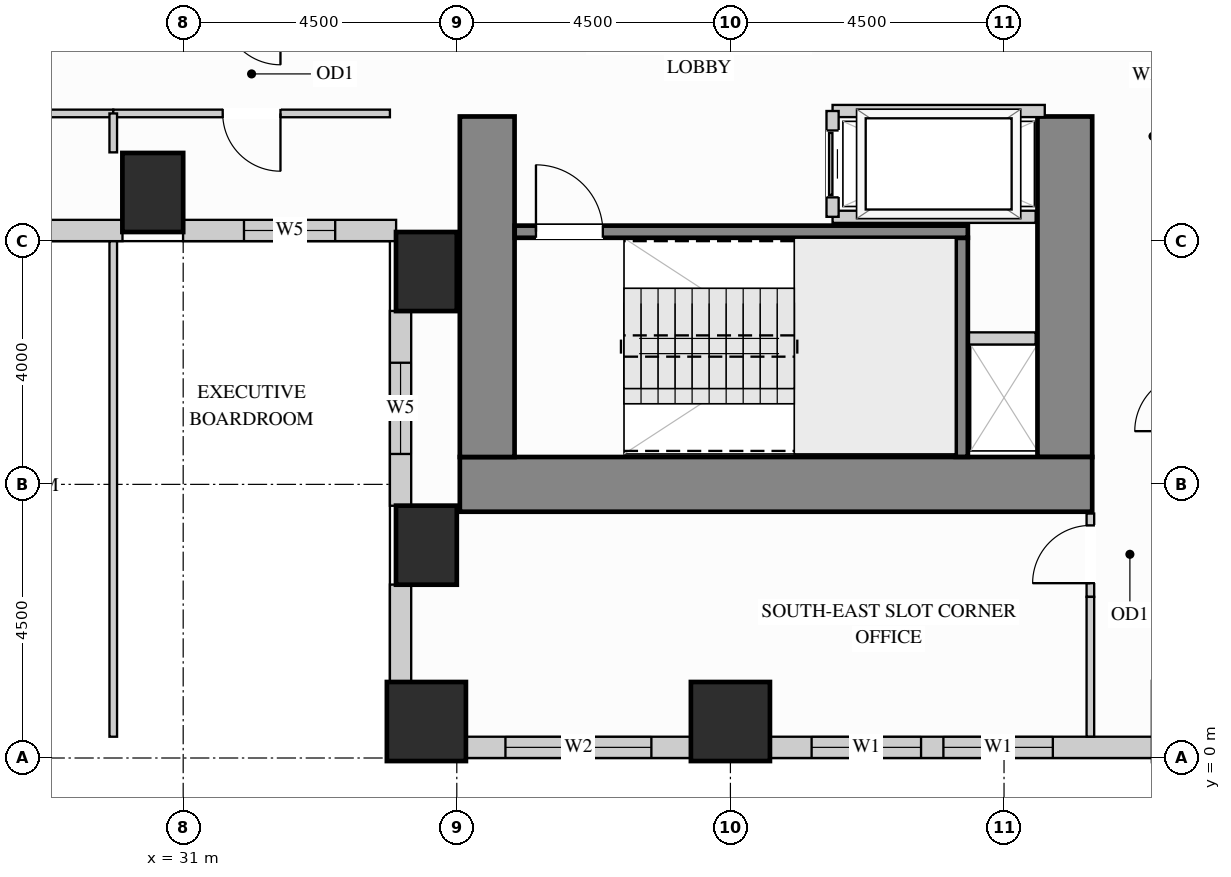
"""IFC4 building model, lengths in metres.
Left out: names, types, materials, properties, quantities, classifications, styles, units other than length and angle.
Written with IfcOpenShell. Run it as: python <this file> out.ifc"""

import sys

from ifc_helpers import new_model, si_unit, direction, frame, frame_2d, origin, origin_2d, place, context, subcontext, project, spatial, rectangle, extrude, source, transform, mapped, element, fill, save


model = new_model("IFC4")
c1 = context("Model", 3, precision=1e-05, world=origin(), true_north=direction((0.0, 1.0)))
c2 = subcontext(c1, "Body", "Model", "MODEL_VIEW")
j1 = project(units=[si_unit("LENGTHUNIT", "METRE"), si_unit("PLANEANGLEUNIT", "RADIAN")], contexts=[c1])
p1 = place(None, origin())
s1 = spatial("IfcSite", under=j1, at=p1, CompositionType="ELEMENT")
p2 = place(p1, origin())
s2 = spatial("IfcBuilding", under=s1, at=p2, CompositionType="ELEMENT")
p3 = place(p2, frame((0.0, 0.0, 51.3)))
s3 = spatial("IfcBuildingStorey", under=s2, at=p3, CompositionType="ELEMENT", Elevation=51.3)
m1 = source(origin(), c2, "Body", "SweptSolid", [
    extrude(rectangle(XDim=1.0, YDim=1.3, at=origin_2d()), origin(), (0.0, 0.0, 1.0), 3.38),
])
for number, where, z_axis, x_axis in (
    (1, (35.0, 3.5, 0.0), (0.0, 0.0, 1.0), (1.0, 0.0, 0.0)),
    (2, (35.0, 8.0, 0.0), (0.0, 0.0, 1.0), (1.0, 0.0, 0.0)),
    (3, (30.5, 9.3, 0.0), (0.0, 0.0, 1.0), (1.0, 0.0, 0.0)),
):
    element("IfcColumn", number, at=place(p3, frame(where, z_axis=z_axis, x_axis=x_axis)), inside=s3, PredefinedType="COLUMN", context=c2, shape_type="MappedRepresentation", body=[
        mapped(m1, transform((0.0, 0.0, 0.0), x_axis=(1.0, 0.0, 0.0), y_axis=(0.0, 1.0, 0.0), z_axis=(0.0, 0.0, 1.0))),
    ])
m2 = source(origin(), c2, "Body", "SweptSolid", [
    extrude(rectangle(XDim=1.3, YDim=1.3, at=origin_2d()), origin(), (0.0, 0.0, 1.0), 3.38),
])
for number, where, z_axis, x_axis in (
    (4, (35.0, 0.6, 0.0), (0.0, 0.0, 1.0), (1.0, 0.0, 0.0)),
    (5, (40.0, 0.6, 0.0), (0.0, 0.0, 1.0), (1.0, 0.0, 0.0)),
):
    element("IfcColumn", number, at=place(p3, frame(where, z_axis=z_axis, x_axis=x_axis)), inside=s3, PredefinedType="COLUMN", context=c2, shape_type="MappedRepresentation", body=[
        mapped(m2, transform((0.0, 0.0, 0.0), x_axis=(1.0, 0.0, 0.0), y_axis=(0.0, 1.0, 0.0), z_axis=(0.0, 0.0, 1.0))),
    ])
m3 = source(origin(), c2, "Body", "SweptSolid", [
    extrude(rectangle(XDim=5.6, YDim=0.9, at=frame_2d((2.8, 0.0))), origin(), (0.0, 0.0, 1.0), 3.38),
])
p4 = place(p3, frame((45.5, 4.95, 0.0), z_axis=(0.0, 0.0, 1.0), x_axis=(0.0, 1.0, 0.0)))
e6 = element("IfcWall", 6, at=p4, inside=s3, PredefinedType="SHEAR", context=c2, shape_type="MappedRepresentation", body=[
    mapped(m3, transform((0.0, 0.0, 0.0), x_axis=(1.0, 0.0, 0.0), y_axis=(0.0, 1.0, 0.0), z_axis=(0.0, 0.0, 1.0))),
])
m4 = source(origin(), c2, "Body", "SweptSolid", [
    extrude(rectangle(XDim=10.4, YDim=0.9, at=frame_2d((5.2, 0.0))), origin(), (0.0, 0.0, 1.0), 3.38),
])
p5 = place(p3, frame((35.55, 4.5, 0.0), z_axis=(0.0, 0.0, 1.0), x_axis=(1.0, 0.0, 0.0)))
e7 = element("IfcWall", 7, at=p5, inside=s3, PredefinedType="SHEAR", context=c2, shape_type="MappedRepresentation", body=[
    mapped(m4, transform((0.0, 0.0, 0.0), x_axis=(1.0, 0.0, 0.0), y_axis=(0.0, 1.0, 0.0), z_axis=(0.0, 0.0, 1.0))),
])
p6 = place(p3, frame((36.0, 4.95, 0.0), z_axis=(0.0, 0.0, 1.0), x_axis=(0.0, 1.0, 0.0)))
e8 = element("IfcWall", 8, at=p6, inside=s3, PredefinedType="SHEAR", context=c2, shape_type="MappedRepresentation", body=[
    mapped(m3, transform((0.0, 0.0, 0.0), x_axis=(1.0, 0.0, 0.0), y_axis=(0.0, 1.0, 0.0), z_axis=(0.0, 0.0, 1.0))),
])
p7 = place(p3, frame((23.898, 8.675, 0.0), z_axis=(0.0, 0.0, 1.0), x_axis=(1.0, 0.0, 0.0)))
e9 = element("IfcWall", 9, at=p7, inside=s3, PredefinedType="SOLIDWALL", context=c2, shape_type="SweptSolid", body=[
    extrude(rectangle(XDim=6.104, YDim=0.35, at=frame_2d((3.052, 0.0))), origin(), (0.0, 0.0, 1.0), 3.365),
])
p8 = place(p7, frame((1.114, 0.0, 0.78)))
e10 = element("IfcOpeningElement", 10, at=p8, cuts=e9, PredefinedType="OPENING", context=c2, shape_type="SweptSolid", body=[
    extrude(rectangle(XDim=1.5, YDim=2.0, at=frame_2d((0.75, 1.0))), frame((0.0, 0.185, 0.0), z_axis=(0.0, -1.0, 0.0), x_axis=(1.0, 0.0, 0.0)), (0.0, 0.0, 1.0), 0.37),
])
p9 = place(p7, frame((3.408, 0.0, 0.78)))
e11 = element("IfcOpeningElement", 11, at=p9, cuts=e9, PredefinedType="OPENING", context=c2, shape_type="SweptSolid", body=[
    extrude(rectangle(XDim=1.5, YDim=2.0, at=frame_2d((0.75, 1.0))), frame((0.0, 0.185, 0.0), z_axis=(0.0, -1.0, 0.0), x_axis=(1.0, 0.0, 0.0)), (0.0, 0.0, 1.0), 0.37),
])
p10 = place(p3, frame((30.998, 8.675, 0.0), z_axis=(0.0, 0.0, 1.0), x_axis=(1.0, 0.0, 0.0)))
e12 = element("IfcWall", 12, at=p10, inside=s3, PredefinedType="SOLIDWALL", context=c2, shape_type="SweptSolid", body=[
    extrude(rectangle(XDim=3.504, YDim=0.35, at=frame_2d((1.752, 0.0))), origin(), (0.0, 0.0, 1.0), 3.365),
])
p11 = place(p10, frame((1.002, 0.0, 0.78)))
e13 = element("IfcOpeningElement", 13, at=p11, cuts=e12, PredefinedType="OPENING", context=c2, shape_type="SweptSolid", body=[
    extrude(rectangle(XDim=1.5, YDim=2.0, at=frame_2d((0.75, 1.0))), frame((0.0, 0.185, 0.0), z_axis=(0.0, -1.0, 0.0), x_axis=(1.0, 0.0, 0.0)), (0.0, 0.0, 1.0), 0.37),
])
p12 = place(p3, frame((34.575, 7.352, 0.0), z_axis=(0.0, 0.0, 1.0), x_axis=(0.0, -1.0, 0.0)))
e14 = element("IfcWall", 14, at=p12, inside=s3, PredefinedType="SOLIDWALL", context=c2, shape_type="SweptSolid", body=[
    extrude(rectangle(XDim=3.204, YDim=0.35, at=frame_2d((1.602, 0.0))), origin(), (0.0, 0.0, 1.0), 2.51),
])
p13 = place(p12, frame((0.852, 0.0, 0.78)))
e15 = element("IfcOpeningElement", 15, at=p13, cuts=e14, PredefinedType="OPENING", context=c2, shape_type="SweptSolid", body=[
    extrude(rectangle(XDim=1.5, YDim=1.55, at=frame_2d((0.75, 0.775))), frame((0.0, 0.185, 0.0), z_axis=(0.0, -1.0, 0.0), x_axis=(1.0, 0.0, 0.0)), (0.0, 0.0, 1.0), 0.37),
])
m5 = source(origin(), c2, "Body", "SweptSolid", [
    extrude(rectangle(XDim=1.604, YDim=0.35, at=frame_2d((0.802, 0.0))), origin(), (0.0, 0.0, 1.0), 2.51),
])
p14 = place(p3, frame((34.575, 2.852, 0.0), z_axis=(0.0, 0.0, 1.0), x_axis=(0.0, -1.0, 0.0)))
e16 = element("IfcWall", 16, at=p14, inside=s3, PredefinedType="SOLIDWALL", context=c2, shape_type="MappedRepresentation", body=[
    mapped(m5, transform((0.0, 0.0, 0.0), x_axis=(1.0, 0.0, 0.0), y_axis=(0.0, 1.0, 0.0), z_axis=(0.0, 0.0, 1.0))),
])
p15 = place(p3, frame((35.648, 0.175, 0.0), z_axis=(0.0, 0.0, 1.0), x_axis=(1.0, 0.0, 0.0)))
e17 = element("IfcWall", 17, at=p15, inside=s3, PredefinedType="SOLIDWALL", context=c2, shape_type="SweptSolid", body=[
    extrude(rectangle(XDim=3.704, YDim=0.35, at=frame_2d((1.852, 0.0))), origin(), (0.0, 0.0, 1.0), 2.51),
])
p16 = place(p15, frame((0.652, 0.0, 0.78)))
e18 = element("IfcOpeningElement", 18, at=p16, cuts=e17, PredefinedType="OPENING", context=c2, shape_type="SweptSolid", body=[
    extrude(rectangle(XDim=2.4, YDim=1.55, at=frame_2d((1.2, 0.775))), frame((0.0, 0.185, 0.0), z_axis=(0.0, -1.0, 0.0), x_axis=(1.0, 0.0, 0.0)), (0.0, 0.0, 1.0), 0.37),
])
p17 = place(p3, frame((40.648, 0.175, 0.0), z_axis=(0.0, 0.0, 1.0), x_axis=(1.0, 0.0, 0.0)))
e19 = element("IfcWall", 19, at=p17, inside=s3, PredefinedType="SOLIDWALL", context=c2, shape_type="SweptSolid", body=[
    extrude(rectangle(XDim=6.304, YDim=0.35, at=frame_2d((3.152, 0.0))), origin(), (0.0, 0.0, 1.0), 2.51),
])
p18 = place(p17, frame((0.687, 0.0, 0.78)))
e20 = element("IfcOpeningElement", 20, at=p18, cuts=e19, PredefinedType="OPENING", context=c2, shape_type="SweptSolid", body=[
    extrude(rectangle(XDim=1.8, YDim=1.55, at=frame_2d((0.9, 0.775))), frame((0.0, 0.185, 0.0), z_axis=(0.0, -1.0, 0.0), x_axis=(1.0, 0.0, 0.0)), (0.0, 0.0, 1.0), 0.37),
])
p19 = place(p17, frame((2.855, 0.0, 0.78)))
e21 = element("IfcOpeningElement", 21, at=p19, cuts=e19, PredefinedType="OPENING", context=c2, shape_type="SweptSolid", body=[
    extrude(rectangle(XDim=1.8, YDim=1.55, at=frame_2d((0.9, 0.775))), frame((0.0, 0.185, 0.0), z_axis=(0.0, -1.0, 0.0), x_axis=(1.0, 0.0, 0.0)), (0.0, 0.0, 1.0), 0.37),
])
p20 = place(p3, frame((45.92, 2.65, 0.0), z_axis=(0.0, 0.0, 1.0), x_axis=(0.0, 1.0, 0.0)))
e22 = element("IfcWall", 22, at=p20, inside=s3, PredefinedType="PARTITIONING", context=c2, shape_type="SweptSolid", body=[
    extrude(rectangle(XDim=1.37, YDim=0.125, at=frame_2d((0.685, 0.0))), origin(), (0.0, 0.0, 1.0), 3.365),
])
p21 = place(p20, frame((0.225, 0.0, 0.0)))
e23 = element("IfcOpeningElement", 23, at=p21, cuts=e22, PredefinedType="OPENING", context=c2, shape_type="SweptSolid", body=[
    extrude(rectangle(XDim=0.95, YDim=2.15, at=frame_2d((0.475, 1.075))), frame((0.0, 0.073, 0.0), z_axis=(0.0, -1.0, 0.0), x_axis=(1.0, 0.0, 0.0)), (0.0, 0.0, 1.0), 0.145),
])
m6 = source(origin(), c2, "Body", "SweptSolid", [
    extrude(rectangle(XDim=2.298, YDim=0.125, at=frame_2d((1.149, 0.0))), origin(), (0.0, 0.0, 1.0), 3.365),
])
p22 = place(p3, frame((45.92, 0.352, 0.0), z_axis=(0.0, 0.0, 1.0), x_axis=(0.0, 1.0, 0.0)))
e24 = element("IfcWall", 24, at=p22, inside=s3, PredefinedType="PARTITIONING", context=c2, shape_type="MappedRepresentation", body=[
    mapped(m6, transform((0.0, 0.0, 0.0), x_axis=(1.0, 0.0, 0.0), y_axis=(0.0, 1.0, 0.0), z_axis=(0.0, 0.0, 1.0))),
])
p23 = place(p3, frame((23.85, 10.6, 0.0), z_axis=(0.0, 0.0, 1.0), x_axis=(1.0, 0.0, 0.0)))
e25 = element("IfcWall", 25, at=p23, inside=s3, PredefinedType="PARTITIONING", context=c2, shape_type="SweptSolid", body=[
    extrude(rectangle(XDim=6.0, YDim=0.125, at=frame_2d((3.0, 0.0))), origin(), (0.0, 0.0, 1.0), 3.365),
])
p24 = place(p23, frame((2.525, 0.0, 0.0)))
e26 = element("IfcOpeningElement", 26, at=p24, cuts=e25, PredefinedType="OPENING", context=c2, shape_type="SweptSolid", body=[
    extrude(rectangle(XDim=0.95, YDim=2.15, at=frame_2d((0.475, 1.075))), frame((0.0, 0.073, 0.0), z_axis=(0.0, -1.0, 0.0), x_axis=(1.0, 0.0, 0.0)), (0.0, 0.0, 1.0), 0.145),
])
p25 = place(p3, frame((29.85, 10.6, 0.0), z_axis=(0.0, 0.0, 1.0), x_axis=(1.0, 0.0, 0.0)))
e27 = element("IfcWall", 27, at=p25, inside=s3, PredefinedType="PARTITIONING", context=c2, shape_type="SweptSolid", body=[
    extrude(rectangle(XDim=4.55, YDim=0.125, at=frame_2d((2.275, 0.0))), origin(), (0.0, 0.0, 1.0), 3.365),
])
p26 = place(p25, frame((1.8, 0.0, 0.0)))
e28 = element("IfcOpeningElement", 28, at=p26, cuts=e27, PredefinedType="OPENING", context=c2, shape_type="SweptSolid", body=[
    extrude(rectangle(XDim=0.95, YDim=2.15, at=frame_2d((0.475, 1.075))), frame((0.0, 0.073, 0.0), z_axis=(0.0, -1.0, 0.0), x_axis=(1.0, 0.0, 0.0)), (0.0, 0.0, 1.0), 0.145),
])
m7 = source(origin(), c2, "Body", "SweptSolid", [
    extrude(rectangle(XDim=8.148, YDim=0.125, at=frame_2d((4.074, 0.0))), origin(), (0.0, 0.0, 1.0), 3.365),
])
p27 = place(p3, frame((29.85, 0.35, 0.0), z_axis=(0.0, 0.0, 1.0), x_axis=(0.0, 1.0, 0.0)))
e29 = element("IfcWall", 29, at=p27, inside=s3, PredefinedType="PARTITIONING", context=c2, shape_type="MappedRepresentation", body=[
    mapped(m7, transform((0.0, 0.0, 0.0), x_axis=(1.0, 0.0, 0.0), y_axis=(0.0, 1.0, 0.0), z_axis=(0.0, 0.0, 1.0))),
])
m8 = source(origin(), c2, "Body", "SweptSolid", [
    extrude(rectangle(XDim=0.64, YDim=0.125, at=frame_2d((0.32, 0.0))), origin(), (0.0, 0.0, 1.0), 3.365),
])
p28 = place(p3, frame((29.85, 9.96, 0.0), z_axis=(0.0, 0.0, 1.0), x_axis=(0.0, 1.0, 0.0)))
e30 = element("IfcWall", 30, at=p28, inside=s3, PredefinedType="PARTITIONING", context=c2, shape_type="MappedRepresentation", body=[
    mapped(m8, transform((0.0, 0.0, 0.0), x_axis=(1.0, 0.0, 0.0), y_axis=(0.0, 1.0, 0.0), z_axis=(0.0, 0.0, 1.0))),
])
m9 = source(origin(), c2, "Body", "SweptSolid", [
    extrude(rectangle(XDim=1.17, YDim=0.2, at=frame_2d((0.585, 0.0))), origin(), (0.0, 0.0, 1.0), 3.365),
])
p29 = place(p3, frame((43.85, 6.9, 0.0), z_axis=(0.0, 0.0, 1.0), x_axis=(1.0, 0.0, 0.0)))
e31 = element("IfcWall", 31, at=p29, inside=s3, PredefinedType="PARTITIONING", context=c2, shape_type="MappedRepresentation", body=[
    mapped(m9, transform((0.0, 0.0, 0.0), x_axis=(1.0, 0.0, 0.0), y_axis=(0.0, 1.0, 0.0), z_axis=(0.0, 0.0, 1.0))),
])
m10 = source(origin(), c2, "Body", "SweptSolid", [
    extrude(rectangle(XDim=3.49, YDim=0.2, at=frame_2d((1.745, 0.0))), origin(), (0.0, 0.0, 1.0), 3.365),
])
p30 = place(p3, frame((41.68, 10.64, 0.0), z_axis=(0.0, 0.0, 1.0), x_axis=(1.0, 0.0, 0.0)))
e32 = element("IfcWall", 32, at=p30, inside=s3, PredefinedType="PARTITIONING", context=c2, shape_type="MappedRepresentation", body=[
    mapped(m10, transform((0.0, 0.0, 0.0), x_axis=(1.0, 0.0, 0.0), y_axis=(0.0, 1.0, 0.0), z_axis=(0.0, 0.0, 1.0))),
])
m11 = source(origin(), c2, "Body", "SweptSolid", [
    extrude(rectangle(XDim=3.34, YDim=0.2, at=frame_2d((1.67, 0.0))), origin(), (0.0, 0.0, 1.0), 3.365),
])
p31 = place(p3, frame((41.68, 8.9, 0.0), z_axis=(0.0, 0.0, 1.0), x_axis=(1.0, 0.0, 0.0)))
e33 = element("IfcWall", 33, at=p31, inside=s3, PredefinedType="PARTITIONING", context=c2, shape_type="MappedRepresentation", body=[
    mapped(m11, transform((0.0, 0.0, 0.0), x_axis=(1.0, 0.0, 0.0), y_axis=(0.0, 1.0, 0.0), z_axis=(0.0, 0.0, 1.0))),
])
p32 = place(p3, frame((41.68, 8.9, 0.0), z_axis=(0.0, 0.0, 1.0), x_axis=(0.0, 1.0, 0.0)))
e34 = element("IfcWall", 34, at=p32, inside=s3, PredefinedType="PARTITIONING", context=c2, shape_type="SweptSolid", body=[
    extrude(rectangle(XDim=1.74, YDim=0.2, at=frame_2d((0.87, 0.0))), origin(), (0.0, 0.0, 1.0), 3.365),
])
p33 = place(p32, frame((0.32, 0.0, 0.0)))
e35 = element("IfcOpeningElement", 35, at=p33, cuts=e34, PredefinedType="OPENING", context=c2, shape_type="SweptSolid", body=[
    extrude(rectangle(XDim=1.1, YDim=2.2, at=frame_2d((0.55, 1.1))), frame((0.0, 0.11, 0.0), z_axis=(0.0, -1.0, 0.0), x_axis=(1.0, 0.0, 0.0)), (0.0, 0.0, 1.0), 0.22),
])
m12 = source(origin(), c2, "Body", "SweptSolid", [
    extrude(rectangle(XDim=3.603, YDim=0.2, at=frame_2d((1.802, 0.0))), origin(), (0.0, 0.0, 1.0), 3.38),
])
p34 = place(p3, frame((43.805, 4.952, 0.0), z_axis=(0.0, 0.0, 1.0), x_axis=(0.0, 1.0, 0.0)))
e36 = element("IfcWall", 36, at=p34, inside=s3, PredefinedType="SHEAR", context=c2, shape_type="MappedRepresentation", body=[
    mapped(m12, transform((0.0, 0.0, 0.0), x_axis=(1.0, 0.0, 0.0), y_axis=(0.0, 1.0, 0.0), z_axis=(0.0, 0.0, 1.0))),
])
p35 = place(p3, frame((36.452, 8.655, 0.0), z_axis=(0.0, 0.0, 1.0), x_axis=(1.0, 0.0, 0.0)))
e37 = element("IfcWall", 37, at=p35, inside=s3, PredefinedType="SHEAR", context=c2, shape_type="SweptSolid", body=[
    extrude(rectangle(XDim=7.453, YDim=0.2, at=frame_2d((3.727, 0.0))), origin(), (0.0, 0.0, 1.0), 3.38),
])
p36 = place(p35, frame((0.35, 0.0, 0.0)))
e38 = element("IfcOpeningElement", 38, at=p36, cuts=e37, PredefinedType="OPENING", context=c2, shape_type="SweptSolid", body=[
    extrude(rectangle(XDim=1.1, YDim=2.15, at=frame_2d((0.55, 1.075))), frame((0.0, 0.11, 0.0), z_axis=(0.0, -1.0, 0.0), x_axis=(1.0, 0.0, 0.0)), (0.0, 0.0, 1.0), 0.22),
])
m13 = source(origin(), c2, "Body", "SweptSolid", [
    extrude(rectangle(XDim=1.1, YDim=2.2, at=frame_2d((0.55, 1.1))), frame((0.0, 0.025, 0.0), z_axis=(0.0, -1.0, 0.0), x_axis=(1.0, 0.0, 0.0)), (0.0, 0.0, 1.0), 0.05),
])
p37 = place(p33, origin())
e39 = element("IfcDoor", 39, at=p37, inside=s3, OperationType="SLIDING_TO_LEFT", PredefinedType="DOOR", context=c2, shape_type="MappedRepresentation", body=[
    mapped(m13, transform((0.0, 0.0, 0.0), x_axis=(1.0, 0.0, 0.0), y_axis=(0.0, 1.0, 0.0), z_axis=(0.0, 0.0, 1.0))),
])
fill(e35, e39)
m14 = source(origin(), c2, "Body", "SweptSolid", [
    extrude(rectangle(XDim=0.95, YDim=2.15, at=frame_2d((0.475, 1.075))), frame((0.0, 0.025, 0.0), z_axis=(0.0, -1.0, 0.0), x_axis=(1.0, 0.0, 0.0)), (0.0, 0.0, 1.0), 0.05),
])
p38 = place(p21, origin())
e40 = element("IfcDoor", 40, at=p38, inside=s3, OperationType="SINGLE_SWING_LEFT", PredefinedType="DOOR", context=c2, shape_type="MappedRepresentation", body=[
    mapped(m14, transform((0.0, 0.0, 0.0), x_axis=(1.0, 0.0, 0.0), y_axis=(0.0, 1.0, 0.0), z_axis=(0.0, 0.0, 1.0))),
])
fill(e23, e40)
p39 = place(p26, origin())
e41 = element("IfcDoor", 41, at=p39, inside=s3, OperationType="SINGLE_SWING_RIGHT", PredefinedType="DOOR", context=c2, shape_type="MappedRepresentation", body=[
    mapped(m14, transform((0.0, 0.0, 0.0), x_axis=(1.0, 0.0, 0.0), y_axis=(0.0, 1.0, 0.0), z_axis=(0.0, 0.0, 1.0))),
])
fill(e28, e41)
m15 = source(origin(), c2, "Body", "SweptSolid", [
    extrude(rectangle(XDim=1.1, YDim=2.15, at=frame_2d((0.55, 1.075))), frame((0.0, 0.025, 0.0), z_axis=(0.0, -1.0, 0.0), x_axis=(1.0, 0.0, 0.0)), (0.0, 0.0, 1.0), 0.05),
])
p40 = place(p36, origin())
e42 = element("IfcDoor", 42, at=p40, inside=s3, OperationType="SINGLE_SWING_LEFT", PredefinedType="DOOR", context=c2, shape_type="MappedRepresentation", body=[
    mapped(m15, transform((0.0, 0.0, 0.0), x_axis=(1.0, 0.0, 0.0), y_axis=(0.0, 1.0, 0.0), z_axis=(0.0, 0.0, 1.0))),
])
fill(e38, e42)
m16 = source(origin(), c2, "Body", "SweptSolid", [
    extrude(rectangle(XDim=1.8, YDim=1.55, at=frame_2d((0.9, 0.775))), frame((0.0, 0.03, 0.0), z_axis=(0.0, -1.0, 0.0), x_axis=(1.0, 0.0, 0.0)), (0.0, 0.0, 1.0), 0.06),
])
p41 = place(p18, origin())
e43 = element("IfcWindow", 43, at=p41, inside=s3, PartitioningType="SINGLE_PANEL", PredefinedType="WINDOW", context=c2, shape_type="MappedRepresentation", body=[
    mapped(m16, transform((0.0, 0.0, 0.0), x_axis=(1.0, 0.0, 0.0), y_axis=(0.0, 1.0, 0.0), z_axis=(0.0, 0.0, 1.0))),
])
fill(e20, e43)
p42 = place(p19, origin())
e44 = element("IfcWindow", 44, at=p42, inside=s3, PartitioningType="SINGLE_PANEL", PredefinedType="WINDOW", context=c2, shape_type="MappedRepresentation", body=[
    mapped(m16, transform((0.0, 0.0, 0.0), x_axis=(1.0, 0.0, 0.0), y_axis=(0.0, 1.0, 0.0), z_axis=(0.0, 0.0, 1.0))),
])
fill(e21, e44)
m17 = source(origin(), c2, "Body", "SweptSolid", [
    extrude(rectangle(XDim=2.4, YDim=1.55, at=frame_2d((1.2, 0.775))), frame((0.0, 0.03, 0.0), z_axis=(0.0, -1.0, 0.0), x_axis=(1.0, 0.0, 0.0)), (0.0, 0.0, 1.0), 0.06),
])
p43 = place(p16, origin())
e45 = element("IfcWindow", 45, at=p43, inside=s3, PartitioningType="SINGLE_PANEL", PredefinedType="WINDOW", context=c2, shape_type="MappedRepresentation", body=[
    mapped(m17, transform((0.0, 0.0, 0.0), x_axis=(1.0, 0.0, 0.0), y_axis=(0.0, 1.0, 0.0), z_axis=(0.0, 0.0, 1.0))),
])
fill(e18, e45)
m18 = source(origin(), c2, "Body", "SweptSolid", [
    extrude(rectangle(XDim=1.5, YDim=2.0, at=frame_2d((0.75, 1.0))), frame((0.0, 0.03, 0.0), z_axis=(0.0, -1.0, 0.0), x_axis=(1.0, 0.0, 0.0)), (0.0, 0.0, 1.0), 0.06),
])
p44 = place(p11, origin())
e46 = element("IfcWindow", 46, at=p44, inside=s3, PartitioningType="SINGLE_PANEL", PredefinedType="WINDOW", context=c2, shape_type="MappedRepresentation", body=[
    mapped(m18, transform((0.0, 0.0, 0.0), x_axis=(1.0, 0.0, 0.0), y_axis=(0.0, 1.0, 0.0), z_axis=(0.0, 0.0, 1.0))),
])
fill(e13, e46)
m19 = source(origin(), c2, "Body", "SweptSolid", [
    extrude(rectangle(XDim=1.5, YDim=1.55, at=frame_2d((0.75, 0.775))), frame((0.0, 0.03, 0.0), z_axis=(0.0, -1.0, 0.0), x_axis=(1.0, 0.0, 0.0)), (0.0, 0.0, 1.0), 0.06),
])
p45 = place(p13, origin())
e47 = element("IfcWindow", 47, at=p45, inside=s3, PartitioningType="SINGLE_PANEL", PredefinedType="WINDOW", context=c2, shape_type="MappedRepresentation", body=[
    mapped(m19, transform((0.0, 0.0, 0.0), x_axis=(1.0, 0.0, 0.0), y_axis=(0.0, 1.0, 0.0), z_axis=(0.0, 0.0, 1.0))),
])
fill(e15, e47)
save(model, sys.argv[1])
